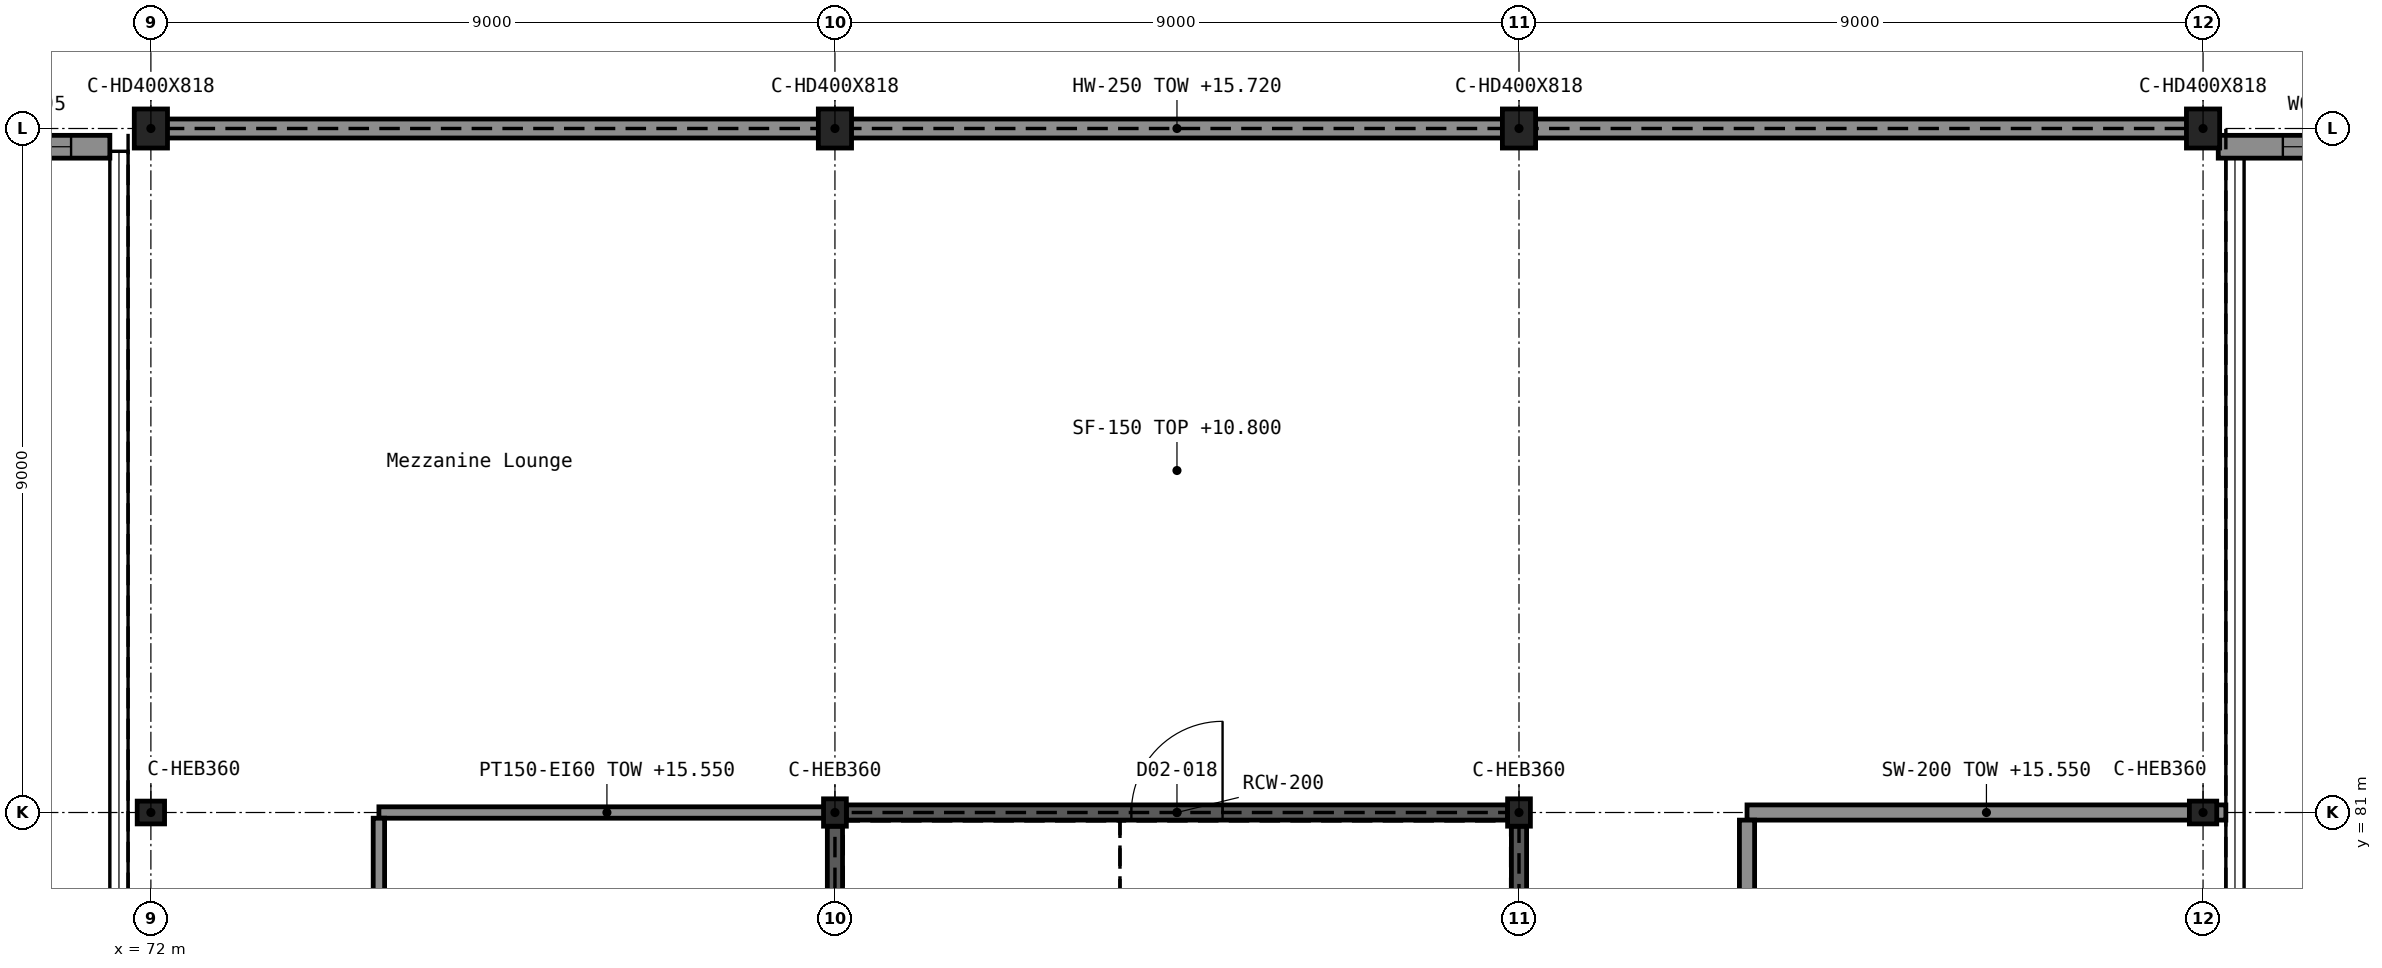
"""IFC4 building model, lengths in metres.
Left out: names, types, materials, properties, quantities, classifications, styles, units other than length and angle.
Written with IfcOpenShell. Run it as: python <this file> out.ifc"""

import sys

from ifc_helpers import new_model, si_unit, direction, frame, frame_2d, origin, origin_2d, place, context, subcontext, project, spatial, rectangle, i_section, extrude, element, fill, save


model = new_model("IFC4")
c1 = context("Model", 3, precision=1e-05, world=origin(), true_north=direction((0.0, 1.0)))
c2 = subcontext(c1, "Body", "Model", "MODEL_VIEW")
j1 = project(units=[si_unit("LENGTHUNIT", "METRE"), si_unit("PLANEANGLEUNIT", "RADIAN")], contexts=[c1])
p1 = place(None, origin())
s1 = spatial("IfcSite", under=j1, at=p1, CompositionType="ELEMENT")
p2 = place(p1, origin())
s2 = spatial("IfcBuilding", under=s1, at=p2, CompositionType="ELEMENT")
p3 = place(p2, frame((0.0, 0.0, 10.8)))
s3 = spatial("IfcBuildingStorey", under=s2, at=p3, CompositionType="ELEMENT", Elevation=10.8)
for number, where, z_axis, x_axis in (
    (1, (72.0, 81.0, 0.0), (0.0, 0.0, 1.0), (0.0, 1.0, 0.0)),
    (2, (81.0, 81.0, 0.0), (0.0, 0.0, 1.0), (1.0, 0.0, 0.0)),
    (3, (90.0, 81.0, 0.0), (0.0, 0.0, 1.0), (1.0, 0.0, 0.0)),
    (4, (99.0, 81.0, 0.0), (0.0, 0.0, 1.0), (0.0, 1.0, 0.0)),
):
    element("IfcColumn", number, at=place(p3, frame(where, z_axis=z_axis, x_axis=x_axis)), inside=s3, PredefinedType="COLUMN", context=c2, shape_type="SweptSolid", body=[
        extrude(i_section(OverallWidth=0.3, OverallDepth=0.36, WebThickness=0.012, FlangeThickness=0.022, FilletRadius=0.027, at=origin_2d()), origin(), (0.0, 0.0, 1.0), 5.4),
    ])
for number, where, z_axis, x_axis in (
    (5, (72.0, 90.0, 0.0), (0.0, 0.0, 1.0), (1.0, 0.0, 0.0)),
    (6, (81.0, 90.0, 0.0), (0.0, 0.0, 1.0), (1.0, 0.0, 0.0)),
    (7, (90.0, 90.0, 0.0), (0.0, 0.0, 1.0), (1.0, 0.0, 0.0)),
    (8, (99.0, 90.0, 0.0), (0.0, 0.0, 1.0), (1.0, 0.0, 0.0)),
):
    element("IfcColumn", number, at=place(p3, frame(where, z_axis=z_axis, x_axis=x_axis)), inside=s3, PredefinedType="COLUMN", context=c2, shape_type="SweptSolid", body=[
        extrude(i_section(OverallWidth=0.437, OverallDepth=0.514, WebThickness=0.061, FlangeThickness=0.097, FilletRadius=0.015, at=origin_2d()), origin(), (0.0, 0.0, 1.0), 5.4),
    ])
p4 = place(p3, frame((63.2, 89.76, 0.0), z_axis=(0.0, 0.0, 1.0), x_axis=(1.0, 0.0, 0.0)))
e9 = element("IfcWall", 9, at=p4, inside=s3, PredefinedType="SOLIDWALL", context=c2, shape_type="SweptSolid", body=[
    extrude(rectangle(XDim=8.26, YDim=0.3, at=frame_2d((4.13, 0.0))), origin(), (0.0, 0.0, 1.0), 5.4),
])
p5 = place(p4, frame((0.8, 0.0, 2.7)))
e10 = element("IfcOpeningElement", 10, at=p5, cuts=e9, PredefinedType="OPENING", context=c2, shape_type="SweptSolid", body=[
    extrude(rectangle(XDim=1.2, YDim=0.9, at=frame_2d((0.6, 0.45))), frame((0.0, 0.161, 0.0), z_axis=(0.0, -1.0, 0.0), x_axis=(1.0, 0.0, 0.0)), (0.0, 0.0, 1.0), 0.322),
])
p6 = place(p4, frame((3.7, 0.0, 2.7)))
e11 = element("IfcOpeningElement", 11, at=p6, cuts=e9, PredefinedType="OPENING", context=c2, shape_type="SweptSolid", body=[
    extrude(rectangle(XDim=1.2, YDim=0.9, at=frame_2d((0.6, 0.45))), frame((0.0, 0.161, 0.0), z_axis=(0.0, -1.0, 0.0), x_axis=(1.0, 0.0, 0.0)), (0.0, 0.0, 1.0), 0.322),
])
p7 = place(p4, frame((6.55, 0.0, 2.7)))
e12 = element("IfcOpeningElement", 12, at=p7, cuts=e9, PredefinedType="OPENING", context=c2, shape_type="SweptSolid", body=[
    extrude(rectangle(XDim=1.2, YDim=0.9, at=frame_2d((0.6, 0.45))), frame((0.0, 0.161, 0.0), z_axis=(0.0, -1.0, 0.0), x_axis=(1.0, 0.0, 0.0)), (0.0, 0.0, 1.0), 0.322),
])
p8 = place(p3, frame((99.2, 89.76, 0.0), z_axis=(0.0, 0.0, 1.0), x_axis=(1.0, 0.0, 0.0)))
e13 = element("IfcWall", 13, at=p8, inside=s3, PredefinedType="SOLIDWALL", context=c2, shape_type="SweptSolid", body=[
    extrude(rectangle(XDim=8.6, YDim=0.3, at=frame_2d((4.3, 0.0))), origin(), (0.0, 0.0, 1.0), 5.4),
])
p9 = place(p8, frame((0.85, 0.0, 2.7)))
e14 = element("IfcOpeningElement", 14, at=p9, cuts=e13, PredefinedType="OPENING", context=c2, shape_type="SweptSolid", body=[
    extrude(rectangle(XDim=1.2, YDim=0.9, at=frame_2d((0.6, 0.45))), frame((0.0, 0.161, 0.0), z_axis=(0.0, -1.0, 0.0), x_axis=(1.0, 0.0, 0.0)), (0.0, 0.0, 1.0), 0.322),
])
p10 = place(p8, frame((3.7, 0.0, 2.7)))
e15 = element("IfcOpeningElement", 15, at=p10, cuts=e13, PredefinedType="OPENING", context=c2, shape_type="SweptSolid", body=[
    extrude(rectangle(XDim=1.2, YDim=0.9, at=frame_2d((0.6, 0.45))), frame((0.0, 0.161, 0.0), z_axis=(0.0, -1.0, 0.0), x_axis=(1.0, 0.0, 0.0)), (0.0, 0.0, 1.0), 0.322),
])
p11 = place(p8, frame((6.6, 0.0, 2.7)))
e16 = element("IfcOpeningElement", 16, at=p11, cuts=e13, PredefinedType="OPENING", context=c2, shape_type="SweptSolid", body=[
    extrude(rectangle(XDim=1.2, YDim=0.9, at=frame_2d((0.6, 0.45))), frame((0.0, 0.161, 0.0), z_axis=(0.0, -1.0, 0.0), x_axis=(1.0, 0.0, 0.0)), (0.0, 0.0, 1.0), 0.322),
])
p12 = place(p3, frame((81.15, 81.0, 0.0), z_axis=(0.0, 0.0, 1.0), x_axis=(1.0, 0.0, 0.0)))
e17 = element("IfcWall", 17, at=p12, inside=s3, PredefinedType="SHEAR", context=c2, shape_type="SweptSolid", body=[
    extrude(rectangle(XDim=8.7, YDim=0.2, at=frame_2d((4.35, 0.0))), origin(), (0.0, 0.0, 1.0), 5.4),
])
p13 = place(p12, frame((3.75, 0.0, 0.0)))
e18 = element("IfcOpeningElement", 18, at=p13, cuts=e17, PredefinedType="OPENING", context=c2, shape_type="SweptSolid", body=[
    extrude(rectangle(XDim=1.2, YDim=2.1, at=frame_2d((0.6, 1.05))), frame((0.0, 0.111, 0.0), z_axis=(0.0, -1.0, 0.0), x_axis=(1.0, 0.0, 0.0)), (0.0, 0.0, 1.0), 0.222),
])
for number, where, z_axis, x_axis in (
    (19, (81.0, 72.18, 0.0), (0.0, 0.0, 1.0), (0.0, 1.0, 0.0)),
    (20, (90.0, 72.18, 0.0), (0.0, 0.0, 1.0), (0.0, 1.0, 0.0)),
):
    element("IfcWall", number, at=place(p3, frame(where, z_axis=z_axis, x_axis=x_axis)), inside=s3, PredefinedType="SHEAR", context=c2, shape_type="SweptSolid", body=[
        extrude(rectangle(XDim=8.64, YDim=0.2, at=frame_2d((4.32, 0.0))), origin(), (0.0, 0.0, 1.0), 5.4),
    ])
p14 = place(p3, frame((72.0, 90.0, 0.0), z_axis=(0.0, 0.0, 1.0), x_axis=(1.0, 0.0, 0.0)))
e21 = element("IfcWall", 21, at=p14, inside=s3, PredefinedType="SOLIDWALL", context=c2, shape_type="SweptSolid", body=[
    extrude(rectangle(XDim=27.0, YDim=0.25, at=frame_2d((13.5, 0.0))), origin(), (0.0, 0.0, 1.0), 4.92),
])
p15 = place(p3, frame((93.0, 81.0, 0.0), z_axis=(0.0, 0.0, 1.0), x_axis=(1.0, 0.0, 0.0)))
e22 = element("IfcWall", 22, at=p15, inside=s3, PredefinedType="SOLIDWALL", context=c2, shape_type="SweptSolid", body=[
    extrude(rectangle(XDim=6.3, YDim=0.2, at=frame_2d((3.15, 0.0))), origin(), (0.0, 0.0, 1.0), 4.75),
])
p16 = place(p3, frame((93.0, 72.1, 0.0), z_axis=(0.0, 0.0, 1.0), x_axis=(0.0, 1.0, 0.0)))
e23 = element("IfcWall", 23, at=p16, inside=s3, PredefinedType="SOLIDWALL", context=c2, shape_type="SweptSolid", body=[
    extrude(rectangle(XDim=8.8, YDim=0.2, at=frame_2d((4.4, 0.0))), origin(), (0.0, 0.0, 1.0), 4.89),
])
p17 = place(p16, frame((4.0, 0.0, 0.0)))
e24 = element("IfcOpeningElement", 24, at=p17, cuts=e23, PredefinedType="OPENING", context=c2, shape_type="SweptSolid", body=[
    extrude(rectangle(XDim=0.8, YDim=2.1, at=frame_2d((0.4, 1.05))), frame((0.0, 0.111, 0.0), z_axis=(0.0, -1.0, 0.0), x_axis=(1.0, 0.0, 0.0)), (0.0, 0.0, 1.0), 0.222),
])
p18 = place(p3, frame((75.0, 81.0, 0.0), z_axis=(0.0, 0.0, 1.0), x_axis=(1.0, 0.0, 0.0)))
e25 = element("IfcWall", 25, at=p18, inside=s3, PredefinedType="PARTITIONING", context=c2, shape_type="SweptSolid", body=[
    extrude(rectangle(XDim=6.0, YDim=0.15, at=frame_2d((3.0, 0.0))), origin(), (0.0, 0.0, 1.0), 4.75),
])
p19 = place(p3, frame((75.0, 72.075, 0.0), z_axis=(0.0, 0.0, 1.0), x_axis=(0.0, 1.0, 0.0)))
e26 = element("IfcWall", 26, at=p19, inside=s3, PredefinedType="PARTITIONING", context=c2, shape_type="SweptSolid", body=[
    extrude(rectangle(XDim=8.85, YDim=0.15, at=frame_2d((4.425, 0.0))), origin(), (0.0, 0.0, 1.0), 4.89),
])
p20 = place(p19, frame((3.975, 0.0, 0.0)))
e27 = element("IfcOpeningElement", 27, at=p20, cuts=e26, PredefinedType="OPENING", context=c2, shape_type="SweptSolid", body=[
    extrude(rectangle(XDim=0.9, YDim=2.4, at=frame_2d((0.45, 1.2))), frame((0.0, 0.086, 0.0), z_axis=(0.0, -1.0, 0.0), x_axis=(1.0, 0.0, 0.0)), (0.0, 0.0, 1.0), 0.172),
])
p21 = place(p7, origin())
e28 = element("IfcWindow", 28, at=p21, inside=s3, PartitioningType="SINGLE_PANEL", PredefinedType="WINDOW", context=c2, shape_type="SweptSolid", body=[
    extrude(rectangle(XDim=1.2, YDim=0.9, at=frame_2d((0.6, 0.45))), frame((0.0, 0.03, 0.0), z_axis=(0.0, -1.0, 0.0), x_axis=(1.0, 0.0, 0.0)), (0.0, 0.0, 1.0), 0.06),
])
fill(e12, e28)
p22 = place(p9, origin())
e29 = element("IfcWindow", 29, at=p22, inside=s3, PartitioningType="SINGLE_PANEL", PredefinedType="WINDOW", context=c2, shape_type="SweptSolid", body=[
    extrude(rectangle(XDim=1.2, YDim=0.9, at=frame_2d((0.6, 0.45))), frame((0.0, 0.03, 0.0), z_axis=(0.0, -1.0, 0.0), x_axis=(1.0, 0.0, 0.0)), (0.0, 0.0, 1.0), 0.06),
])
fill(e14, e29)
p23 = place(p13, origin())
e30 = element("IfcDoor", 30, at=p23, inside=s3, OperationType="SINGLE_SWING_RIGHT", PredefinedType="DOOR", context=c2, shape_type="SweptSolid", body=[
    extrude(rectangle(XDim=1.2, YDim=2.1, at=frame_2d((0.6, 1.05))), frame((0.0, 0.025, 0.0), z_axis=(0.0, -1.0, 0.0), x_axis=(1.0, 0.0, 0.0)), (0.0, 0.0, 1.0), 0.05),
])
fill(e18, e30)
save(model, sys.argv[1])
